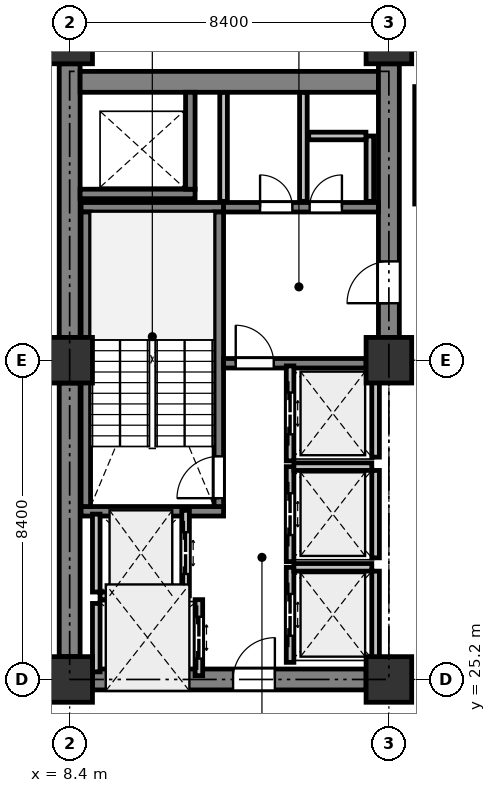
"""IFC4 building model, lengths in metres.
Left out: names, types, materials, properties, quantities, classifications, styles, units other than length and angle.
Written with IfcOpenShell. Run it as: python <this file> out.ifc"""

import sys

from ifc_helpers import new_model, si_unit, direction, frame, frame_2d, origin, origin_2d, place, context, subcontext, project, spatial, rectangle, extrude, element, fill, save


model = new_model("IFC4")
c1 = context("Model", 3, precision=1e-05, world=origin(), true_north=direction((0.0, 1.0)))
c2 = subcontext(c1, "Body", "Model", "MODEL_VIEW")
j1 = project(units=[si_unit("LENGTHUNIT", "METRE"), si_unit("PLANEANGLEUNIT", "RADIAN")], contexts=[c1])
p1 = place(None, origin())
s1 = spatial("IfcSite", under=j1, at=p1, CompositionType="ELEMENT")
p2 = place(p1, origin())
s2 = spatial("IfcBuilding", under=s1, at=p2, CompositionType="ELEMENT")
p3 = place(p2, frame((0.0, 0.0, 109.0)))
s3 = spatial("IfcBuildingStorey", under=s2, at=p3, CompositionType="ELEMENT", Elevation=109.0)
for number, where, z_axis, x_axis in (
    (1, (8.4, 25.2, 0.0), (0.0, 0.0, 1.0), (1.0, 0.0, 0.0)),
    (2, (8.4, 33.6, 0.0), (0.0, 0.0, 1.0), (1.0, 0.0, 0.0)),
    (3, (8.4, 42.0, 0.0), (0.0, 0.0, 1.0), (1.0, 0.0, 0.0)),
    (4, (16.8, 25.2, 0.0), (0.0, 0.0, 1.0), (1.0, 0.0, 0.0)),
    (5, (16.8, 33.6, 0.0), (0.0, 0.0, 1.0), (1.0, 0.0, 0.0)),
    (6, (16.8, 42.0, 0.0), (0.0, 0.0, 1.0), (1.0, 0.0, 0.0)),
):
    element("IfcColumn", number, at=place(p3, frame(where, z_axis=z_axis, x_axis=x_axis)), inside=s3, PredefinedType="COLUMN", context=c2, shape_type="SweptSolid", body=[
        extrude(rectangle(XDim=1.2, YDim=1.2, at=origin_2d()), origin(), (0.0, 0.0, 1.0), 4.1),
    ])
for number, where, z_axis, x_axis in (
    (7, (8.4, 25.8, 0.0), (0.0, 0.0, 1.0), (0.0, 1.0, 0.0)),
    (8, (8.4, 34.2, 0.0), (0.0, 0.0, 1.0), (0.0, 1.0, 0.0)),
):
    element("IfcWall", number, at=place(p3, frame(where, z_axis=z_axis, x_axis=x_axis)), inside=s3, PredefinedType="SHEAR", context=c2, shape_type="SweptSolid", body=[
        extrude(rectangle(XDim=7.2, YDim=0.55, at=frame_2d((3.6, 0.0))), origin(), (0.0, 0.0, 1.0), 3.75),
    ])
p4 = place(p3, frame((8.675, 40.925, 0.0), z_axis=(0.0, 0.0, 1.0), x_axis=(1.0, 0.0, 0.0)))
e9 = element("IfcWall", 9, at=p4, inside=s3, PredefinedType="SHEAR", context=c2, shape_type="SweptSolid", body=[
    extrude(rectangle(XDim=7.85, YDim=0.55, at=frame_2d((3.925, 0.0))), origin(), (0.0, 0.0, 1.0), 3.75),
])
p5 = place(p3, frame((16.8, 34.2, 0.0), z_axis=(0.0, 0.0, 1.0), x_axis=(0.0, 1.0, 0.0)))
e10 = element("IfcWall", 10, at=p5, inside=s3, PredefinedType="SHEAR", context=c2, shape_type="SweptSolid", body=[
    extrude(rectangle(XDim=7.2, YDim=0.55, at=frame_2d((3.6, 0.0))), origin(), (0.0, 0.0, 1.0), 3.75),
])
p6 = place(p5, frame((0.9, 0.0, 0.0)))
e11 = element("IfcOpeningElement", 11, at=p6, cuts=e10, PredefinedType="OPENING", context=c2, shape_type="SweptSolid", body=[
    extrude(rectangle(XDim=1.1, YDim=2.15, at=frame_2d((0.55, 1.075))), frame((0.0, 0.285, 0.0), z_axis=(0.0, -1.0, 0.0), x_axis=(1.0, 0.0, 0.0)), (0.0, 0.0, 1.0), 0.57),
])
p7 = place(p3, frame((9.0, 25.2, 0.0), z_axis=(0.0, 0.0, 1.0), x_axis=(1.0, 0.0, 0.0)))
e12 = element("IfcWall", 12, at=p7, inside=s3, PredefinedType="SHEAR", context=c2, shape_type="SweptSolid", body=[
    extrude(rectangle(XDim=7.2, YDim=0.55, at=frame_2d((3.6, 0.0))), origin(), (0.0, 0.0, 1.0), 3.75),
])
p8 = place(p7, frame((3.7, 0.0, 0.0)))
e13 = element("IfcOpeningElement", 13, at=p8, cuts=e12, PredefinedType="OPENING", context=c2, shape_type="SweptSolid", body=[
    extrude(rectangle(XDim=1.1, YDim=2.15, at=frame_2d((0.55, 1.075))), frame((0.0, 0.285, 0.0), z_axis=(0.0, -1.0, 0.0), x_axis=(1.0, 0.0, 0.0)), (0.0, 0.0, 1.0), 0.57),
])
for number, where, z_axis, x_axis in (
    (14, (12.45, 29.625, 0.0), (0.0, 0.0, 1.0), (-1.0, 0.0, 0.0)),
    (15, (12.45, 37.625, 0.0), (0.0, 0.0, 1.0), (-1.0, 0.0, 0.0)),
):
    element("IfcWall", number, at=place(p3, frame(where, z_axis=z_axis, x_axis=x_axis)), inside=s3, PredefinedType="SHEAR", context=c2, shape_type="SweptSolid", body=[
        extrude(rectangle(XDim=3.75, YDim=0.25, at=frame_2d((1.875, 0.0))), origin(), (0.0, 0.0, 1.0), 3.75),
    ])
p9 = place(p3, frame((12.325, 29.75, 0.0), z_axis=(0.0, 0.0, 1.0), x_axis=(0.0, 1.0, 0.0)))
e16 = element("IfcWall", 16, at=p9, inside=s3, PredefinedType="SHEAR", context=c2, shape_type="SweptSolid", body=[
    extrude(rectangle(XDim=7.75, YDim=0.25, at=frame_2d((3.875, 0.0))), origin(), (0.0, 0.0, 1.0), 3.75),
])
p10 = place(p9, frame((0.22, 0.0, 0.0)))
e17 = element("IfcOpeningElement", 17, at=p10, cuts=e16, PredefinedType="OPENING", context=c2, shape_type="SweptSolid", body=[
    extrude(rectangle(XDim=1.1, YDim=2.15, at=frame_2d((0.55, 1.075))), frame((0.0, 0.135, 0.0), z_axis=(0.0, -1.0, 0.0), x_axis=(1.0, 0.0, 0.0)), (0.0, 0.0, 1.0), 0.27),
])
p11 = place(p3, frame((8.825, 29.75, 0.0), z_axis=(0.0, 0.0, 1.0), x_axis=(0.0, 1.0, 0.0)))
e18 = element("IfcWall", 18, at=p11, inside=s3, PredefinedType="SHEAR", context=c2, shape_type="SweptSolid", body=[
    extrude(rectangle(XDim=7.75, YDim=0.25, at=frame_2d((3.875, 0.0))), origin(), (0.0, 0.0, 1.0), 3.75),
])
p12 = place(p3, frame((8.675, 37.975, 0.0), z_axis=(0.0, 0.0, 1.0), x_axis=(1.0, 0.0, 0.0)))
e19 = element("IfcWall", 19, at=p12, inside=s3, PredefinedType="SHEAR", context=c2, shape_type="SweptSolid", body=[
    extrude(rectangle(XDim=3.025, YDim=0.25, at=frame_2d((1.512, 0.0))), origin(), (0.0, 0.0, 1.0), 3.75),
])
p13 = place(p3, frame((11.575, 38.1, 0.0), z_axis=(0.0, 0.0, 1.0), x_axis=(0.0, 1.0, 0.0)))
e20 = element("IfcWall", 20, at=p13, inside=s3, PredefinedType="SHEAR", context=c2, shape_type="SweptSolid", body=[
    extrude(rectangle(XDim=2.55, YDim=0.25, at=frame_2d((1.275, 0.0))), origin(), (0.0, 0.0, 1.0), 3.75),
])
p14 = place(p3, frame((12.45, 33.52, 0.0), z_axis=(0.0, 0.0, 1.0), x_axis=(1.0, 0.0, 0.0)))
e21 = element("IfcWall", 21, at=p14, inside=s3, PredefinedType="SHEAR", context=c2, shape_type="SweptSolid", body=[
    extrude(rectangle(XDim=3.75, YDim=0.25, at=frame_2d((1.875, 0.0))), origin(), (0.0, 0.0, 1.0), 3.75),
])
p15 = place(p14, frame((0.32, 0.0, 0.0)))
e22 = element("IfcOpeningElement", 22, at=p15, cuts=e21, PredefinedType="OPENING", context=c2, shape_type="SweptSolid", body=[
    extrude(rectangle(XDim=1.0, YDim=2.15, at=frame_2d((0.5, 1.075))), frame((0.0, 0.135, 0.0), z_axis=(0.0, -1.0, 0.0), x_axis=(1.0, 0.0, 0.0)), (0.0, 0.0, 1.0), 0.27),
])
p16 = place(p3, frame((12.45, 37.625, 0.0), z_axis=(0.0, 0.0, 1.0), x_axis=(1.0, 0.0, 0.0)))
e23 = element("IfcWall", 23, at=p16, inside=s3, PredefinedType="SHEAR", context=c2, shape_type="SweptSolid", body=[
    extrude(rectangle(XDim=4.075, YDim=0.25, at=frame_2d((2.038, 0.0))), origin(), (0.0, 0.0, 1.0), 3.75),
])
p17 = place(p16, frame((0.96, 0.0, 0.0)))
e24 = element("IfcOpeningElement", 24, at=p17, cuts=e23, PredefinedType="OPENING", context=c2, shape_type="SweptSolid", body=[
    extrude(rectangle(XDim=0.85, YDim=2.15, at=frame_2d((0.425, 1.075))), frame((0.0, 0.135, 0.0), z_axis=(0.0, -1.0, 0.0), x_axis=(1.0, 0.0, 0.0)), (0.0, 0.0, 1.0), 0.27),
])
p18 = place(p16, frame((2.264, 0.0, 0.0)))
e25 = element("IfcOpeningElement", 25, at=p18, cuts=e23, PredefinedType="OPENING", context=c2, shape_type="SweptSolid", body=[
    extrude(rectangle(XDim=0.85, YDim=2.15, at=frame_2d((0.425, 1.075))), frame((0.0, 0.135, 0.0), z_axis=(0.0, -1.0, 0.0), x_axis=(1.0, 0.0, 0.0)), (0.0, 0.0, 1.0), 0.27),
])
p19 = place(p3, frame((11.45, 27.4, 0.0), z_axis=(0.0, 0.0, 1.0), x_axis=(0.0, 1.0, 0.0)))
e26 = element("IfcWall", 26, at=p19, inside=s3, PredefinedType="PARTITIONING", context=c2, shape_type="SweptSolid", body=[
    extrude(rectangle(XDim=2.25, YDim=0.2, at=frame_2d((1.125, 0.0))), origin(), (0.0, 0.0, 1.0), 3.75),
])
p20 = place(p19, frame((0.575, 0.0, 0.0)))
e27 = element("IfcOpeningElement", 27, at=p20, cuts=e26, PredefinedType="OPENING", context=c2, shape_type="SweptSolid", body=[
    extrude(rectangle(XDim=1.1, YDim=2.2, at=frame_2d((0.55, 1.1))), frame((0.0, 0.11, 0.0), z_axis=(0.0, -1.0, 0.0), x_axis=(1.0, 0.0, 0.0)), (0.0, 0.0, 1.0), 0.22),
])
p21 = place(p3, frame((9.1, 27.5, 0.0), z_axis=(0.0, 0.0, 1.0), x_axis=(0.0, 1.0, 0.0)))
e28 = element("IfcWall", 28, at=p21, inside=s3, PredefinedType="PARTITIONING", context=c2, shape_type="SweptSolid", body=[
    extrude(rectangle(XDim=2.05, YDim=0.2, at=frame_2d((1.025, 0.0))), origin(), (0.0, 0.0, 1.0), 3.75),
])
p22 = place(p3, frame((9.2, 27.4, 0.0), z_axis=(0.0, 0.0, 1.0), x_axis=(1.0, 0.0, 0.0)))
e29 = element("IfcWall", 29, at=p22, inside=s3, PredefinedType="PARTITIONING", context=c2, shape_type="SweptSolid", body=[
    extrude(rectangle(XDim=2.15, YDim=0.2, at=frame_2d((1.075, 0.0))), origin(), (0.0, 0.0, 1.0), 3.75),
])
p23 = place(p3, frame((11.8, 25.3, 0.0), z_axis=(0.0, 0.0, 1.0), x_axis=(0.0, 1.0, 0.0)))
e30 = element("IfcWall", 30, at=p23, inside=s3, PredefinedType="PARTITIONING", context=c2, shape_type="SweptSolid", body=[
    extrude(rectangle(XDim=2.0, YDim=0.2, at=frame_2d((1.0, 0.0))), origin(), (0.0, 0.0, 1.0), 3.75),
])
p24 = place(p23, frame((0.45, 0.0, 0.0)))
e31 = element("IfcOpeningElement", 31, at=p24, cuts=e30, PredefinedType="OPENING", context=c2, shape_type="SweptSolid", body=[
    extrude(rectangle(XDim=1.1, YDim=2.2, at=frame_2d((0.55, 1.1))), frame((0.0, 0.11, 0.0), z_axis=(0.0, -1.0, 0.0), x_axis=(1.0, 0.0, 0.0)), (0.0, 0.0, 1.0), 0.22),
])
p25 = place(p3, frame((9.1, 25.4, 0.0), z_axis=(0.0, 0.0, 1.0), x_axis=(0.0, 1.0, 0.0)))
e32 = element("IfcWall", 32, at=p25, inside=s3, PredefinedType="PARTITIONING", context=c2, shape_type="SweptSolid", body=[
    extrude(rectangle(XDim=1.8, YDim=0.2, at=frame_2d((0.9, 0.0))), origin(), (0.0, 0.0, 1.0), 3.75),
])
p26 = place(p3, frame((14.2, 25.65, 0.0), z_axis=(0.0, 0.0, 1.0), x_axis=(0.0, 1.0, 0.0)))
e33 = element("IfcWall", 33, at=p26, inside=s3, PredefinedType="PARTITIONING", context=c2, shape_type="SweptSolid", body=[
    extrude(rectangle(XDim=2.5, YDim=0.2, at=frame_2d((1.25, 0.0))), origin(), (0.0, 0.0, 1.0), 3.75),
])
p27 = place(p26, frame((0.7, 0.0, 0.0)))
e34 = element("IfcOpeningElement", 34, at=p27, cuts=e33, PredefinedType="OPENING", context=c2, shape_type="SweptSolid", body=[
    extrude(rectangle(XDim=1.1, YDim=2.2, at=frame_2d((0.55, 1.1))), frame((0.0, 0.11, 0.0), z_axis=(0.0, -1.0, 0.0), x_axis=(1.0, 0.0, 0.0)), (0.0, 0.0, 1.0), 0.22),
])
p28 = place(p3, frame((16.45, 25.75, 0.0), z_axis=(0.0, 0.0, 1.0), x_axis=(0.0, 1.0, 0.0)))
e35 = element("IfcWall", 35, at=p28, inside=s3, PredefinedType="PARTITIONING", context=c2, shape_type="SweptSolid", body=[
    extrude(rectangle(XDim=2.3, YDim=0.2, at=frame_2d((1.15, 0.0))), origin(), (0.0, 0.0, 1.0), 3.75),
])
p29 = place(p3, frame((14.3, 28.15, 0.0), z_axis=(0.0, 0.0, 1.0), x_axis=(1.0, 0.0, 0.0)))
e36 = element("IfcWall", 36, at=p29, inside=s3, PredefinedType="PARTITIONING", context=c2, shape_type="SweptSolid", body=[
    extrude(rectangle(XDim=2.05, YDim=0.2, at=frame_2d((1.025, 0.0))), origin(), (0.0, 0.0, 1.0), 3.75),
])
p30 = place(p3, frame((14.2, 28.3, 0.0), z_axis=(0.0, 0.0, 1.0), x_axis=(0.0, 1.0, 0.0)))
e37 = element("IfcWall", 37, at=p30, inside=s3, PredefinedType="PARTITIONING", context=c2, shape_type="SweptSolid", body=[
    extrude(rectangle(XDim=2.5, YDim=0.2, at=frame_2d((1.25, 0.0))), origin(), (0.0, 0.0, 1.0), 3.75),
])
p31 = place(p30, frame((0.7, 0.0, 0.0)))
e38 = element("IfcOpeningElement", 38, at=p31, cuts=e37, PredefinedType="OPENING", context=c2, shape_type="SweptSolid", body=[
    extrude(rectangle(XDim=1.1, YDim=2.2, at=frame_2d((0.55, 1.1))), frame((0.0, 0.11, 0.0), z_axis=(0.0, -1.0, 0.0), x_axis=(1.0, 0.0, 0.0)), (0.0, 0.0, 1.0), 0.22),
])
p32 = place(p3, frame((16.45, 28.4, 0.0), z_axis=(0.0, 0.0, 1.0), x_axis=(0.0, 1.0, 0.0)))
e39 = element("IfcWall", 39, at=p32, inside=s3, PredefinedType="PARTITIONING", context=c2, shape_type="SweptSolid", body=[
    extrude(rectangle(XDim=2.3, YDim=0.2, at=frame_2d((1.15, 0.0))), origin(), (0.0, 0.0, 1.0), 3.75),
])
p33 = place(p3, frame((14.3, 30.8, 0.0), z_axis=(0.0, 0.0, 1.0), x_axis=(1.0, 0.0, 0.0)))
e40 = element("IfcWall", 40, at=p33, inside=s3, PredefinedType="PARTITIONING", context=c2, shape_type="SweptSolid", body=[
    extrude(rectangle(XDim=2.05, YDim=0.2, at=frame_2d((1.025, 0.0))), origin(), (0.0, 0.0, 1.0), 3.75),
])
p34 = place(p3, frame((14.2, 30.95, 0.0), z_axis=(0.0, 0.0, 1.0), x_axis=(0.0, 1.0, 0.0)))
e41 = element("IfcWall", 41, at=p34, inside=s3, PredefinedType="PARTITIONING", context=c2, shape_type="SweptSolid", body=[
    extrude(rectangle(XDim=2.5, YDim=0.2, at=frame_2d((1.25, 0.0))), origin(), (0.0, 0.0, 1.0), 3.75),
])
p35 = place(p34, frame((0.7, 0.0, 0.0)))
e42 = element("IfcOpeningElement", 42, at=p35, cuts=e41, PredefinedType="OPENING", context=c2, shape_type="SweptSolid", body=[
    extrude(rectangle(XDim=1.1, YDim=2.2, at=frame_2d((0.55, 1.1))), frame((0.0, 0.11, 0.0), z_axis=(0.0, -1.0, 0.0), x_axis=(1.0, 0.0, 0.0)), (0.0, 0.0, 1.0), 0.22),
])
p36 = place(p3, frame((16.45, 31.05, 0.0), z_axis=(0.0, 0.0, 1.0), x_axis=(0.0, 1.0, 0.0)))
e43 = element("IfcWall", 43, at=p36, inside=s3, PredefinedType="PARTITIONING", context=c2, shape_type="SweptSolid", body=[
    extrude(rectangle(XDim=2.3, YDim=0.2, at=frame_2d((1.15, 0.0))), origin(), (0.0, 0.0, 1.0), 3.75),
])
for number, where, z_axis, x_axis in (
    (44, (14.55, 37.78, 0.0), (0.0, 0.0, 1.0), (0.0, 1.0, 0.0)),
    (45, (12.45, 40.646, 0.0), (0.0, 0.0, 1.0), (0.0, -1.0, 0.0)),
):
    element("IfcWall", number, at=place(p3, frame(where, z_axis=z_axis, x_axis=x_axis)), inside=s3, PredefinedType="PARTITIONING", context=c2, shape_type="SweptSolid", body=[
        extrude(rectangle(XDim=2.866, YDim=0.2, at=frame_2d((1.433, 0.0))), origin(), (0.0, 0.0, 1.0), 2.65),
    ])
p37 = place(p3, frame((16.3, 37.78, 0.0), z_axis=(0.0, 0.0, 1.0), x_axis=(0.0, 1.0, 0.0)))
e46 = element("IfcWall", 46, at=p37, inside=s3, PredefinedType="PARTITIONING", context=c2, shape_type="SweptSolid", body=[
    extrude(rectangle(XDim=1.72, YDim=0.2, at=frame_2d((0.86, 0.0))), origin(), (0.0, 0.0, 1.0), 2.65),
])
p38 = place(p3, frame((16.196, 39.5, 0.0), z_axis=(0.0, 0.0, 1.0), x_axis=(-1.0, 0.0, 0.0)))
e47 = element("IfcWall", 47, at=p38, inside=s3, PredefinedType="PARTITIONING", context=c2, shape_type="SweptSolid", body=[
    extrude(rectangle(XDim=1.506, YDim=0.2, at=frame_2d((0.753, 0.0))), origin(), (0.0, 0.0, 1.0), 2.65),
])
p39 = place(p3, frame((17.54, 37.71, 0.0), z_axis=(0.0, 0.0, 1.0), x_axis=(0.0, 1.0, 0.0)))
e48 = element("IfcWall", 48, at=p39, inside=s3, PredefinedType="PARTITIONING", context=c2, shape_type="SweptSolid", body=[
    extrude(rectangle(XDim=3.09, YDim=0.12, at=frame_2d((1.545, 0.0))), origin(), (0.0, 0.0, 1.0), 3.75),
])
p40 = place(p6, origin())
e49 = element("IfcDoor", 49, at=p40, inside=s3, OperationType="SINGLE_SWING_LEFT", PredefinedType="DOOR", context=c2, shape_type="SweptSolid", body=[
    extrude(rectangle(XDim=1.1, YDim=2.15, at=frame_2d((0.55, 1.075))), frame((0.0, 0.025, 0.0), z_axis=(0.0, -1.0, 0.0), x_axis=(1.0, 0.0, 0.0)), (0.0, 0.0, 1.0), 0.05),
])
fill(e11, e49)
p41 = place(p8, origin())
e50 = element("IfcDoor", 50, at=p41, inside=s3, OperationType="SINGLE_SWING_RIGHT", PredefinedType="DOOR", context=c2, shape_type="SweptSolid", body=[
    extrude(rectangle(XDim=1.1, YDim=2.15, at=frame_2d((0.55, 1.075))), frame((0.0, 0.025, 0.0), z_axis=(0.0, -1.0, 0.0), x_axis=(1.0, 0.0, 0.0)), (0.0, 0.0, 1.0), 0.05),
])
fill(e13, e50)
p42 = place(p10, origin())
e51 = element("IfcDoor", 51, at=p42, inside=s3, OperationType="SINGLE_SWING_LEFT", PredefinedType="DOOR", context=c2, shape_type="SweptSolid", body=[
    extrude(rectangle(XDim=1.1, YDim=2.15, at=frame_2d((0.55, 1.075))), frame((0.0, 0.025, 0.0), z_axis=(0.0, -1.0, 0.0), x_axis=(1.0, 0.0, 0.0)), (0.0, 0.0, 1.0), 0.05),
])
fill(e17, e51)
p43 = place(p15, origin())
e52 = element("IfcDoor", 52, at=p43, inside=s3, OperationType="SINGLE_SWING_LEFT", PredefinedType="DOOR", context=c2, shape_type="SweptSolid", body=[
    extrude(rectangle(XDim=1.0, YDim=2.15, at=frame_2d((0.5, 1.075))), frame((0.0, 0.025, 0.0), z_axis=(0.0, -1.0, 0.0), x_axis=(1.0, 0.0, 0.0)), (0.0, 0.0, 1.0), 0.05),
])
fill(e22, e52)
p44 = place(p20, origin())
e53 = element("IfcDoor", 53, at=p44, inside=s3, OperationType="DOUBLE_DOOR_SLIDING", PredefinedType="DOOR", context=c2, shape_type="SweptSolid", body=[
    extrude(rectangle(XDim=1.1, YDim=2.2, at=frame_2d((0.55, 1.1))), frame((0.0, 0.025, 0.0), z_axis=(0.0, -1.0, 0.0), x_axis=(1.0, 0.0, 0.0)), (0.0, 0.0, 1.0), 0.05),
])
fill(e27, e53)
p45 = place(p24, origin())
e54 = element("IfcDoor", 54, at=p45, inside=s3, OperationType="DOUBLE_DOOR_SLIDING", PredefinedType="DOOR", context=c2, shape_type="SweptSolid", body=[
    extrude(rectangle(XDim=1.1, YDim=2.2, at=frame_2d((0.55, 1.1))), frame((0.0, 0.025, 0.0), z_axis=(0.0, -1.0, 0.0), x_axis=(1.0, 0.0, 0.0)), (0.0, 0.0, 1.0), 0.05),
])
fill(e31, e54)
p46 = place(p27, origin())
e55 = element("IfcDoor", 55, at=p46, inside=s3, OperationType="DOUBLE_DOOR_SLIDING", PredefinedType="DOOR", context=c2, shape_type="SweptSolid", body=[
    extrude(rectangle(XDim=1.1, YDim=2.2, at=frame_2d((0.55, 1.1))), frame((0.0, 0.025, 0.0), z_axis=(0.0, -1.0, 0.0), x_axis=(1.0, 0.0, 0.0)), (0.0, 0.0, 1.0), 0.05),
])
fill(e34, e55)
p47 = place(p31, origin())
e56 = element("IfcDoor", 56, at=p47, inside=s3, OperationType="DOUBLE_DOOR_SLIDING", PredefinedType="DOOR", context=c2, shape_type="SweptSolid", body=[
    extrude(rectangle(XDim=1.1, YDim=2.2, at=frame_2d((0.55, 1.1))), frame((0.0, 0.025, 0.0), z_axis=(0.0, -1.0, 0.0), x_axis=(1.0, 0.0, 0.0)), (0.0, 0.0, 1.0), 0.05),
])
fill(e38, e56)
p48 = place(p35, origin())
e57 = element("IfcDoor", 57, at=p48, inside=s3, OperationType="DOUBLE_DOOR_SLIDING", PredefinedType="DOOR", context=c2, shape_type="SweptSolid", body=[
    extrude(rectangle(XDim=1.1, YDim=2.2, at=frame_2d((0.55, 1.1))), frame((0.0, 0.025, 0.0), z_axis=(0.0, -1.0, 0.0), x_axis=(1.0, 0.0, 0.0)), (0.0, 0.0, 1.0), 0.05),
])
fill(e42, e57)
p49 = place(p17, origin())
e58 = element("IfcDoor", 58, at=p49, inside=s3, OperationType="SINGLE_SWING_LEFT", PredefinedType="DOOR", context=c2, shape_type="SweptSolid", body=[
    extrude(rectangle(XDim=0.85, YDim=2.15, at=frame_2d((0.425, 1.075))), frame((0.0, 0.025, 0.0), z_axis=(0.0, -1.0, 0.0), x_axis=(1.0, 0.0, 0.0)), (0.0, 0.0, 1.0), 0.05),
])
fill(e24, e58)
p50 = place(p18, origin())
e59 = element("IfcDoor", 59, at=p50, inside=s3, OperationType="SINGLE_SWING_RIGHT", PredefinedType="DOOR", context=c2, shape_type="SweptSolid", body=[
    extrude(rectangle(XDim=0.85, YDim=2.15, at=frame_2d((0.425, 1.075))), frame((0.0, 0.025, 0.0), z_axis=(0.0, -1.0, 0.0), x_axis=(1.0, 0.0, 0.0)), (0.0, 0.0, 1.0), 0.05),
])
fill(e25, e59)
save(model, sys.argv[1])
